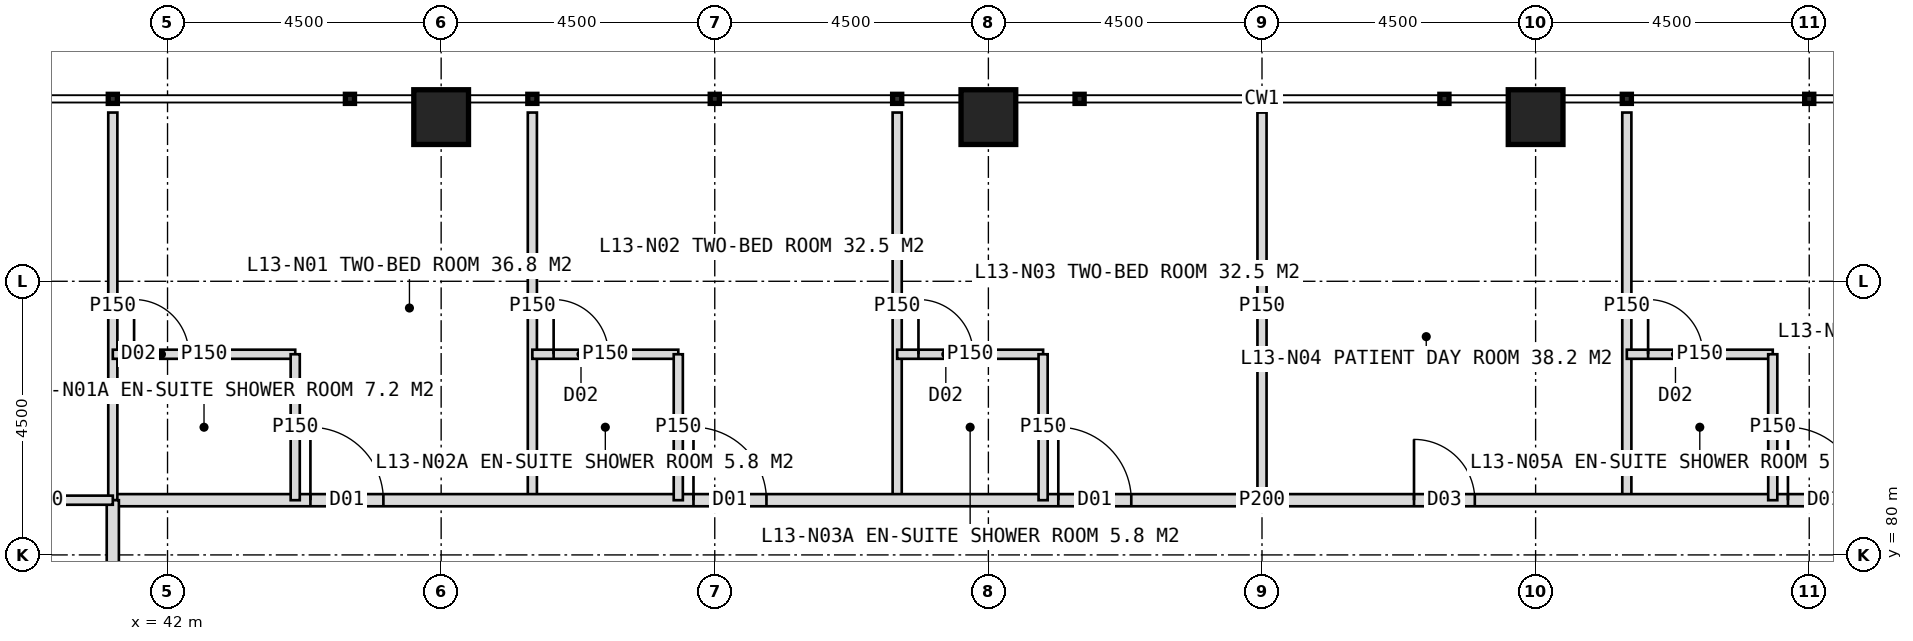
"""IFC4 building model, lengths in metres.
Left out: names, types, materials, properties, quantities, classifications, styles, units other than length and angle.
Written with IfcOpenShell. Run it as: python <this file> out.ifc"""

import sys

from ifc_helpers import new_model, si_unit, direction, frame, frame_2d, origin, origin_2d, place, context, subcontext, project, spatial, rectangle, hollow_rectangle, extrude, element, fill, save


model = new_model("IFC4")
c1 = context("Model", 3, precision=1e-05, world=origin(), true_north=direction((0.0, 1.0)))
c2 = subcontext(c1, "Body", "Model", "MODEL_VIEW")
j1 = project(units=[si_unit("LENGTHUNIT", "METRE"), si_unit("PLANEANGLEUNIT", "RADIAN")], contexts=[c1])
p1 = place(None, origin())
s1 = spatial("IfcSite", under=j1, at=p1, CompositionType="ELEMENT")
p2 = place(p1, origin())
s2 = spatial("IfcBuilding", under=s1, at=p2, CompositionType="ELEMENT")
p3 = place(p2, frame((0.0, 0.0, 59.0)))
s3 = spatial("IfcBuildingStorey", under=s2, at=p3, CompositionType="ELEMENT", Elevation=59.0)
for number, where, z_axis, x_axis in (
    (1, (46.5, 87.2, 0.0), (0.0, 0.0, 1.0), (1.0, 0.0, 0.0)),
    (2, (55.5, 87.2, 0.0), (0.0, 0.0, 1.0), (1.0, 0.0, 0.0)),
    (3, (64.5, 87.2, 0.0), (0.0, 0.0, 1.0), (1.0, 0.0, 0.0)),
):
    element("IfcColumn", number, at=place(p3, frame(where, z_axis=z_axis, x_axis=x_axis)), inside=s3, PredefinedType="COLUMN", context=c2, shape_type="SweptSolid", body=[
        extrude(hollow_rectangle(XDim=0.9, YDim=0.9, WallThickness=0.08, at=origin_2d()), origin(), (0.0, 0.0, 1.0), 4.0),
    ])
for number, where, z_axis, x_axis in (
    (4, (48.0, 80.9, 0.0), (0.0, 0.0, 1.0), (0.0, 1.0, 0.0)),
    (5, (54.0, 80.9, 0.0), (0.0, 0.0, 1.0), (0.0, 1.0, 0.0)),
):
    element("IfcWall", number, at=place(p3, frame(where, z_axis=z_axis, x_axis=x_axis)), inside=s3, PredefinedType="PARTITIONING", context=c2, shape_type="SweptSolid", body=[
        extrude(rectangle(XDim=6.375, YDim=0.15, at=frame_2d((3.188, 0.0))), origin(), (0.0, 0.0, 1.0), 3.75),
    ])
p4 = place(p3, frame((60.0, 80.9, 0.0), z_axis=(0.0, 0.0, 1.0), x_axis=(0.0, 1.0, 0.0)))
e6 = element("IfcWall", 6, at=p4, inside=s3, PredefinedType="PARTITIONING", context=c2, shape_type="SweptSolid", body=[
    extrude(rectangle(XDim=6.375, YDim=0.15, at=frame_2d((3.188, 0.0))), origin(), (0.0, 0.0, 1.0), 2.75),
])
p5 = place(p3, frame((66.0, 80.9, 0.0), z_axis=(0.0, 0.0, 1.0), x_axis=(0.0, 1.0, 0.0)))
e7 = element("IfcWall", 7, at=p5, inside=s3, PredefinedType="PARTITIONING", context=c2, shape_type="SweptSolid", body=[
    extrude(rectangle(XDim=6.375, YDim=0.15, at=frame_2d((3.188, 0.0))), origin(), (0.0, 0.0, 1.0), 3.75),
])
p6 = place(p3, frame((41.1, 80.9, 0.0), z_axis=(0.0, 0.0, 1.0), x_axis=(1.0, 0.0, 0.0)))
e8 = element("IfcWall", 8, at=p6, inside=s3, PredefinedType="PARTITIONING", context=c2, shape_type="SweptSolid", body=[
    extrude(rectangle(XDim=37.8, YDim=0.2, at=frame_2d((18.9, 0.0))), origin(), (0.0, 0.0, 1.0), 3.75),
])
p7 = place(p6, frame((3.25, 0.0, 0.0)))
e9 = element("IfcOpeningElement", 9, at=p7, cuts=e8, PredefinedType="OPENING", context=c2, shape_type="SweptSolid", body=[
    extrude(rectangle(XDim=1.2, YDim=2.2, at=frame_2d((0.6, 1.1))), frame((0.0, 0.11, 0.0), z_axis=(0.0, -1.0, 0.0), x_axis=(1.0, 0.0, 0.0)), (0.0, 0.0, 1.0), 0.22),
])
p8 = place(p6, frame((9.55, 0.0, 0.0)))
e10 = element("IfcOpeningElement", 10, at=p8, cuts=e8, PredefinedType="OPENING", context=c2, shape_type="SweptSolid", body=[
    extrude(rectangle(XDim=1.2, YDim=2.2, at=frame_2d((0.6, 1.1))), frame((0.0, 0.11, 0.0), z_axis=(0.0, -1.0, 0.0), x_axis=(1.0, 0.0, 0.0)), (0.0, 0.0, 1.0), 0.22),
])
p9 = place(p6, frame((15.55, 0.0, 0.0)))
e11 = element("IfcOpeningElement", 11, at=p9, cuts=e8, PredefinedType="OPENING", context=c2, shape_type="SweptSolid", body=[
    extrude(rectangle(XDim=1.2, YDim=2.2, at=frame_2d((0.6, 1.1))), frame((0.0, 0.11, 0.0), z_axis=(0.0, -1.0, 0.0), x_axis=(1.0, 0.0, 0.0)), (0.0, 0.0, 1.0), 0.22),
])
p10 = place(p6, frame((21.4, 0.0, 0.0)))
e12 = element("IfcOpeningElement", 12, at=p10, cuts=e8, PredefinedType="OPENING", context=c2, shape_type="SweptSolid", body=[
    extrude(rectangle(XDim=1.0, YDim=2.1, at=frame_2d((0.5, 1.05))), frame((0.0, 0.11, 0.0), z_axis=(0.0, -1.0, 0.0), x_axis=(1.0, 0.0, 0.0)), (0.0, 0.0, 1.0), 0.22),
])
p11 = place(p6, frame((27.55, 0.0, 0.0)))
e13 = element("IfcOpeningElement", 13, at=p11, cuts=e8, PredefinedType="OPENING", context=c2, shape_type="SweptSolid", body=[
    extrude(rectangle(XDim=1.2, YDim=2.2, at=frame_2d((0.6, 1.1))), frame((0.0, 0.11, 0.0), z_axis=(0.0, -1.0, 0.0), x_axis=(1.0, 0.0, 0.0)), (0.0, 0.0, 1.0), 0.22),
])
p12 = place(p3, frame((41.1, 80.9, 0.0), z_axis=(0.0, 0.0, 1.0), x_axis=(0.0, 1.0, 0.0)))
e14 = element("IfcWall", 14, at=p12, inside=s3, PredefinedType="PARTITIONING", context=c2, shape_type="SweptSolid", body=[
    extrude(rectangle(XDim=6.375, YDim=0.15, at=frame_2d((3.188, 0.0))), origin(), (0.0, 0.0, 1.0), 3.75),
])
p13 = place(p3, frame((41.1, 83.3, 0.0), z_axis=(0.0, 0.0, 1.0), x_axis=(1.0, 0.0, 0.0)))
e15 = element("IfcWall", 15, at=p13, inside=s3, PredefinedType="PARTITIONING", context=c2, shape_type="SweptSolid", body=[
    extrude(rectangle(XDim=3.0, YDim=0.15, at=frame_2d((1.5, 0.0))), origin(), (0.0, 0.0, 1.0), 3.75),
])
p14 = place(p13, frame((0.35, 0.0, 0.0)))
e16 = element("IfcOpeningElement", 16, at=p14, cuts=e15, PredefinedType="OPENING", context=c2, shape_type="SweptSolid", body=[
    extrude(rectangle(XDim=0.9, YDim=2.1, at=frame_2d((0.45, 1.05))), frame((0.0, 0.085, 0.0), z_axis=(0.0, -1.0, 0.0), x_axis=(1.0, 0.0, 0.0)), (0.0, 0.0, 1.0), 0.17),
])
p15 = place(p3, frame((44.1, 80.9, 0.0), z_axis=(0.0, 0.0, 1.0), x_axis=(0.0, 1.0, 0.0)))
e17 = element("IfcWall", 17, at=p15, inside=s3, PredefinedType="PARTITIONING", context=c2, shape_type="SweptSolid", body=[
    extrude(rectangle(XDim=2.4, YDim=0.15, at=frame_2d((1.2, 0.0))), origin(), (0.0, 0.0, 1.0), 3.75),
])
p16 = place(p3, frame((48.0, 83.3, 0.0), z_axis=(0.0, 0.0, 1.0), x_axis=(1.0, 0.0, 0.0)))
e18 = element("IfcWall", 18, at=p16, inside=s3, PredefinedType="PARTITIONING", context=c2, shape_type="SweptSolid", body=[
    extrude(rectangle(XDim=2.4, YDim=0.15, at=frame_2d((1.2, 0.0))), origin(), (0.0, 0.0, 1.0), 3.75),
])
p17 = place(p16, frame((0.35, 0.0, 0.0)))
e19 = element("IfcOpeningElement", 19, at=p17, cuts=e18, PredefinedType="OPENING", context=c2, shape_type="SweptSolid", body=[
    extrude(rectangle(XDim=0.9, YDim=2.1, at=frame_2d((0.45, 1.05))), frame((0.0, 0.085, 0.0), z_axis=(0.0, -1.0, 0.0), x_axis=(1.0, 0.0, 0.0)), (0.0, 0.0, 1.0), 0.17),
])
p18 = place(p3, frame((50.4, 80.9, 0.0), z_axis=(0.0, 0.0, 1.0), x_axis=(0.0, 1.0, 0.0)))
e20 = element("IfcWall", 20, at=p18, inside=s3, PredefinedType="PARTITIONING", context=c2, shape_type="SweptSolid", body=[
    extrude(rectangle(XDim=2.4, YDim=0.15, at=frame_2d((1.2, 0.0))), origin(), (0.0, 0.0, 1.0), 3.75),
])
p19 = place(p3, frame((54.0, 83.3, 0.0), z_axis=(0.0, 0.0, 1.0), x_axis=(1.0, 0.0, 0.0)))
e21 = element("IfcWall", 21, at=p19, inside=s3, PredefinedType="PARTITIONING", context=c2, shape_type="SweptSolid", body=[
    extrude(rectangle(XDim=2.4, YDim=0.15, at=frame_2d((1.2, 0.0))), origin(), (0.0, 0.0, 1.0), 3.75),
])
p20 = place(p19, frame((0.35, 0.0, 0.0)))
e22 = element("IfcOpeningElement", 22, at=p20, cuts=e21, PredefinedType="OPENING", context=c2, shape_type="SweptSolid", body=[
    extrude(rectangle(XDim=0.9, YDim=2.1, at=frame_2d((0.45, 1.05))), frame((0.0, 0.085, 0.0), z_axis=(0.0, -1.0, 0.0), x_axis=(1.0, 0.0, 0.0)), (0.0, 0.0, 1.0), 0.17),
])
p21 = place(p3, frame((56.4, 80.9, 0.0), z_axis=(0.0, 0.0, 1.0), x_axis=(0.0, 1.0, 0.0)))
e23 = element("IfcWall", 23, at=p21, inside=s3, PredefinedType="PARTITIONING", context=c2, shape_type="SweptSolid", body=[
    extrude(rectangle(XDim=2.4, YDim=0.15, at=frame_2d((1.2, 0.0))), origin(), (0.0, 0.0, 1.0), 3.75),
])
p22 = place(p3, frame((66.0, 83.3, 0.0), z_axis=(0.0, 0.0, 1.0), x_axis=(1.0, 0.0, 0.0)))
e24 = element("IfcWall", 24, at=p22, inside=s3, PredefinedType="PARTITIONING", context=c2, shape_type="SweptSolid", body=[
    extrude(rectangle(XDim=2.4, YDim=0.15, at=frame_2d((1.2, 0.0))), origin(), (0.0, 0.0, 1.0), 3.75),
])
p23 = place(p22, frame((0.35, 0.0, 0.0)))
e25 = element("IfcOpeningElement", 25, at=p23, cuts=e24, PredefinedType="OPENING", context=c2, shape_type="SweptSolid", body=[
    extrude(rectangle(XDim=0.9, YDim=2.1, at=frame_2d((0.45, 1.05))), frame((0.0, 0.085, 0.0), z_axis=(0.0, -1.0, 0.0), x_axis=(1.0, 0.0, 0.0)), (0.0, 0.0, 1.0), 0.17),
])
p24 = place(p3, frame((68.4, 80.9, 0.0), z_axis=(0.0, 0.0, 1.0), x_axis=(0.0, 1.0, 0.0)))
e26 = element("IfcWall", 26, at=p24, inside=s3, PredefinedType="PARTITIONING", context=c2, shape_type="SweptSolid", body=[
    extrude(rectangle(XDim=2.4, YDim=0.15, at=frame_2d((1.2, 0.0))), origin(), (0.0, 0.0, 1.0), 3.75),
])
p25 = place(p3, frame((41.1, 43.1, 0.0), z_axis=(0.0, 0.0, 1.0), x_axis=(0.0, 1.0, 0.0)))
e27 = element("IfcWall", 27, at=p25, inside=s3, PredefinedType="PARTITIONING", context=c2, shape_type="SweptSolid", body=[
    extrude(rectangle(XDim=37.8, YDim=0.2, at=frame_2d((18.9, 0.0))), origin(), (0.0, 0.0, 1.0), 3.75),
])
p26 = place(p25, frame((3.25, 0.0, 0.0)))
e28 = element("IfcOpeningElement", 28, at=p26, cuts=e27, PredefinedType="OPENING", context=c2, shape_type="SweptSolid", body=[
    extrude(rectangle(XDim=1.2, YDim=2.2, at=frame_2d((0.6, 1.1))), frame((0.0, 0.11, 0.0), z_axis=(0.0, -1.0, 0.0), x_axis=(1.0, 0.0, 0.0)), (0.0, 0.0, 1.0), 0.22),
])
p27 = place(p25, frame((9.55, 0.0, 0.0)))
e29 = element("IfcOpeningElement", 29, at=p27, cuts=e27, PredefinedType="OPENING", context=c2, shape_type="SweptSolid", body=[
    extrude(rectangle(XDim=1.2, YDim=2.2, at=frame_2d((0.6, 1.1))), frame((0.0, 0.11, 0.0), z_axis=(0.0, -1.0, 0.0), x_axis=(1.0, 0.0, 0.0)), (0.0, 0.0, 1.0), 0.22),
])
p28 = place(p25, frame((15.55, 0.0, 0.0)))
e30 = element("IfcOpeningElement", 30, at=p28, cuts=e27, PredefinedType="OPENING", context=c2, shape_type="SweptSolid", body=[
    extrude(rectangle(XDim=1.2, YDim=2.2, at=frame_2d((0.6, 1.1))), frame((0.0, 0.11, 0.0), z_axis=(0.0, -1.0, 0.0), x_axis=(1.0, 0.0, 0.0)), (0.0, 0.0, 1.0), 0.22),
])
p29 = place(p25, frame((21.55, 0.0, 0.0)))
e31 = element("IfcOpeningElement", 31, at=p29, cuts=e27, PredefinedType="OPENING", context=c2, shape_type="SweptSolid", body=[
    extrude(rectangle(XDim=1.2, YDim=2.2, at=frame_2d((0.6, 1.1))), frame((0.0, 0.11, 0.0), z_axis=(0.0, -1.0, 0.0), x_axis=(1.0, 0.0, 0.0)), (0.0, 0.0, 1.0), 0.22),
])
p30 = place(p25, frame((27.55, 0.0, 0.0)))
e32 = element("IfcOpeningElement", 32, at=p30, cuts=e27, PredefinedType="OPENING", context=c2, shape_type="SweptSolid", body=[
    extrude(rectangle(XDim=1.2, YDim=2.2, at=frame_2d((0.6, 1.1))), frame((0.0, 0.11, 0.0), z_axis=(0.0, -1.0, 0.0), x_axis=(1.0, 0.0, 0.0)), (0.0, 0.0, 1.0), 0.22),
])
p31 = place(p3, frame((41.1, 80.9, 0.0), z_axis=(0.0, 0.0, 1.0), x_axis=(-1.0, 0.0, 0.0)))
e33 = element("IfcWall", 33, at=p31, inside=s3, PredefinedType="PARTITIONING", context=c2, shape_type="SweptSolid", body=[
    extrude(rectangle(XDim=2.4, YDim=0.15, at=frame_2d((1.2, 0.0))), origin(), (0.0, 0.0, 1.0), 3.75),
])
p32 = place(p7, origin())
e34 = element("IfcDoor", 34, at=p32, inside=s3, OperationType="SINGLE_SWING_LEFT", PredefinedType="DOOR", context=c2, shape_type="SweptSolid", body=[
    extrude(rectangle(XDim=1.2, YDim=2.2, at=frame_2d((0.6, 1.1))), frame((0.0, 0.025, 0.0), z_axis=(0.0, -1.0, 0.0), x_axis=(1.0, 0.0, 0.0)), (0.0, 0.0, 1.0), 0.05),
])
fill(e9, e34)
p33 = place(p14, origin())
e35 = element("IfcDoor", 35, at=p33, inside=s3, OperationType="SINGLE_SWING_LEFT", PredefinedType="DOOR", context=c2, shape_type="SweptSolid", body=[
    extrude(rectangle(XDim=0.9, YDim=2.1, at=frame_2d((0.45, 1.05))), frame((0.0, 0.025, 0.0), z_axis=(0.0, -1.0, 0.0), x_axis=(1.0, 0.0, 0.0)), (0.0, 0.0, 1.0), 0.05),
])
fill(e16, e35)
p34 = place(p8, origin())
e36 = element("IfcDoor", 36, at=p34, inside=s3, OperationType="SINGLE_SWING_LEFT", PredefinedType="DOOR", context=c2, shape_type="SweptSolid", body=[
    extrude(rectangle(XDim=1.2, YDim=2.2, at=frame_2d((0.6, 1.1))), frame((0.0, 0.025, 0.0), z_axis=(0.0, -1.0, 0.0), x_axis=(1.0, 0.0, 0.0)), (0.0, 0.0, 1.0), 0.05),
])
fill(e10, e36)
p35 = place(p17, origin())
e37 = element("IfcDoor", 37, at=p35, inside=s3, OperationType="SINGLE_SWING_LEFT", PredefinedType="DOOR", context=c2, shape_type="SweptSolid", body=[
    extrude(rectangle(XDim=0.9, YDim=2.1, at=frame_2d((0.45, 1.05))), frame((0.0, 0.025, 0.0), z_axis=(0.0, -1.0, 0.0), x_axis=(1.0, 0.0, 0.0)), (0.0, 0.0, 1.0), 0.05),
])
fill(e19, e37)
p36 = place(p9, origin())
e38 = element("IfcDoor", 38, at=p36, inside=s3, OperationType="SINGLE_SWING_LEFT", PredefinedType="DOOR", context=c2, shape_type="SweptSolid", body=[
    extrude(rectangle(XDim=1.2, YDim=2.2, at=frame_2d((0.6, 1.1))), frame((0.0, 0.025, 0.0), z_axis=(0.0, -1.0, 0.0), x_axis=(1.0, 0.0, 0.0)), (0.0, 0.0, 1.0), 0.05),
])
fill(e11, e38)
p37 = place(p20, origin())
e39 = element("IfcDoor", 39, at=p37, inside=s3, OperationType="SINGLE_SWING_LEFT", PredefinedType="DOOR", context=c2, shape_type="SweptSolid", body=[
    extrude(rectangle(XDim=0.9, YDim=2.1, at=frame_2d((0.45, 1.05))), frame((0.0, 0.025, 0.0), z_axis=(0.0, -1.0, 0.0), x_axis=(1.0, 0.0, 0.0)), (0.0, 0.0, 1.0), 0.05),
])
fill(e22, e39)
p38 = place(p10, origin())
e40 = element("IfcDoor", 40, at=p38, inside=s3, OperationType="SINGLE_SWING_LEFT", PredefinedType="DOOR", context=c2, shape_type="SweptSolid", body=[
    extrude(rectangle(XDim=1.0, YDim=2.1, at=frame_2d((0.5, 1.05))), frame((0.0, 0.025, 0.0), z_axis=(0.0, -1.0, 0.0), x_axis=(1.0, 0.0, 0.0)), (0.0, 0.0, 1.0), 0.05),
])
fill(e12, e40)
p39 = place(p11, origin())
e41 = element("IfcDoor", 41, at=p39, inside=s3, OperationType="SINGLE_SWING_LEFT", PredefinedType="DOOR", context=c2, shape_type="SweptSolid", body=[
    extrude(rectangle(XDim=1.2, YDim=2.2, at=frame_2d((0.6, 1.1))), frame((0.0, 0.025, 0.0), z_axis=(0.0, -1.0, 0.0), x_axis=(1.0, 0.0, 0.0)), (0.0, 0.0, 1.0), 0.05),
])
fill(e13, e41)
p40 = place(p23, origin())
e42 = element("IfcDoor", 42, at=p40, inside=s3, OperationType="SINGLE_SWING_LEFT", PredefinedType="DOOR", context=c2, shape_type="SweptSolid", body=[
    extrude(rectangle(XDim=0.9, YDim=2.1, at=frame_2d((0.45, 1.05))), frame((0.0, 0.025, 0.0), z_axis=(0.0, -1.0, 0.0), x_axis=(1.0, 0.0, 0.0)), (0.0, 0.0, 1.0), 0.05),
])
fill(e25, e42)
save(model, sys.argv[1])
